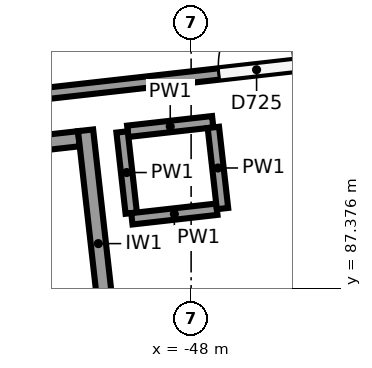
"""IFC4 building model, lengths in metres.
Left out: names, types, materials, properties, quantities, classifications, styles, units other than length and angle.
Written with IfcOpenShell. Run it as: python <this file> out.ifc"""

import sys

from ifc_helpers import new_model, si_unit, direction, frame, frame_2d, origin, place, context, subcontext, project, spatial, rectangle, extrude, element, fill, save


model = new_model("IFC4")
c1 = context("Model", 3, precision=1e-05, world=origin(), true_north=direction((0.0, 1.0)))
c2 = subcontext(c1, "Body", "Model", "MODEL_VIEW")
j1 = project(units=[si_unit("LENGTHUNIT", "METRE"), si_unit("PLANEANGLEUNIT", "RADIAN")], contexts=[c1])
p1 = place(None, origin())
s1 = spatial("IfcSite", under=j1, at=p1, CompositionType="ELEMENT")
p2 = place(p1, origin())
s2 = spatial("IfcBuilding", under=s1, at=p2, CompositionType="ELEMENT")
p3 = place(p2, frame((0.0, 0.0, -4.0)))
s3 = spatial("IfcBuildingStorey", under=s2, at=p3, CompositionType="ELEMENT", Elevation=-4.0)
p4 = place(p3, frame((-49.389, 89.454, -1.2), z_axis=(0.0, 0.0, 1.0), x_axis=(0.111976588553, -0.993710845073, 0.0)))
e1 = element("IfcWall", 1, at=p4, inside=s3, PredefinedType="SHEAR", context=c2, shape_type="SweptSolid", body=[
    extrude(rectangle(XDim=3.0, YDim=0.2, at=frame_2d((1.5, 0.0))), origin(), (0.0, 0.0, 1.0), 4.8),
])
p5 = place(p3, frame((-49.477, 89.343, -1.2), z_axis=(0.0, 0.0, 1.0), x_axis=(-0.993718105662, -0.11191213732, 0.0)))
e2 = element("IfcWall", 2, at=p5, inside=s3, PredefinedType="SHEAR", context=c2, shape_type="SweptSolid", body=[
    extrude(rectangle(XDim=1.9, YDim=0.2, at=frame_2d((0.95, 0.0))), origin(), (0.0, 0.0, 1.0), 4.8),
])
p6 = place(p3, frame((-47.716, 89.567, 0.0), z_axis=(0.0, 0.0, 1.0), x_axis=(-0.993710504932, -0.11197960702, 0.0)))
e3 = element("IfcWall", 3, at=p6, inside=s3, PredefinedType="PARTITIONING", context=c2, shape_type="SweptSolid", body=[
    extrude(rectangle(XDim=1.125, YDim=0.15, at=frame_2d((0.562, 0.0))), origin(), (0.0, 0.0, 1.0), 3.6),
])
p7 = place(p3, frame((-48.908, 89.432, 0.0), z_axis=(0.0, 0.0, 1.0), x_axis=(0.111951742856, -0.993713644503, 0.0)))
e4 = element("IfcWall", 4, at=p7, inside=s3, PredefinedType="PARTITIONING", context=c2, shape_type="SweptSolid", body=[
    extrude(rectangle(XDim=1.075, YDim=0.15, at=frame_2d((0.538, 0.0))), origin(), (0.0, 0.0, 1.0), 3.6),
])
p8 = place(p3, frame((-48.78, 88.29, 0.0), z_axis=(0.0, 0.0, 1.0), x_axis=(0.993710504932, 0.11197960702, 0.0)))
e5 = element("IfcWall", 5, at=p8, inside=s3, PredefinedType="PARTITIONING", context=c2, shape_type="SweptSolid", body=[
    extrude(rectangle(XDim=1.125, YDim=0.15, at=frame_2d((0.562, 0.0))), origin(), (0.0, 0.0, 1.0), 3.6),
])
p9 = place(p3, frame((-47.587, 88.424, 0.0), z_axis=(0.0, 0.0, 1.0), x_axis=(-0.111951742856, 0.993713644503, 0.0)))
e6 = element("IfcWall", 6, at=p9, inside=s3, PredefinedType="PARTITIONING", context=c2, shape_type="SweptSolid", body=[
    extrude(rectangle(XDim=1.075, YDim=0.15, at=frame_2d((0.538, 0.0))), origin(), (0.0, 0.0, 1.0), 3.6),
])
p10 = place(p3, frame((-57.125, 89.125, 0.0), z_axis=(0.0, 0.0, 1.0), x_axis=(0.993711991836, 0.111966411396, 0.0)))
e7 = element("IfcWall", 7, at=p10, inside=s3, PredefinedType="PARTITIONING", context=c2, shape_type="SweptSolid", body=[
    extrude(rectangle(XDim=12.097, YDim=0.15, at=frame_2d((6.049, 0.0))), origin(), (0.0, 0.0, 1.0), 2.5),
])
p11 = place(p10, frame((9.55, 0.0, 0.0)))
e8 = element("IfcOpeningElement", 8, at=p11, cuts=e7, PredefinedType="OPENING", context=c2, shape_type="SweptSolid", body=[
    extrude(rectangle(XDim=1.0, YDim=2.1, at=frame_2d((0.5, 1.05))), frame((0.0, 0.085, 0.0), z_axis=(0.0, -1.0, 0.0), x_axis=(1.0, 0.0, 0.0)), (0.0, 0.0, 1.0), 0.17),
])
p12 = place(p10, frame((4.45, 0.0, 0.0)))
e9 = element("IfcOpeningElement", 9, at=p12, cuts=e7, PredefinedType="OPENING", context=c2, shape_type="SweptSolid", body=[
    extrude(rectangle(XDim=1.0, YDim=2.1, at=frame_2d((0.5, 1.05))), frame((0.0, 0.085, 0.0), z_axis=(0.0, -1.0, 0.0), x_axis=(1.0, 0.0, 0.0)), (0.0, 0.0, 1.0), 0.17),
])
p13 = place(p11, origin())
e10 = element("IfcDoor", 10, at=p13, inside=s3, OperationType="SINGLE_SWING_RIGHT", PredefinedType="DOOR", context=c2, shape_type="SweptSolid", body=[
    extrude(rectangle(XDim=1.0, YDim=2.1, at=frame_2d((0.5, 1.05))), frame((0.0, 0.025, 0.0), z_axis=(0.0, -1.0, 0.0), x_axis=(1.0, 0.0, 0.0)), (0.0, 0.0, 1.0), 0.05),
])
fill(e8, e10)
save(model, sys.argv[1])
